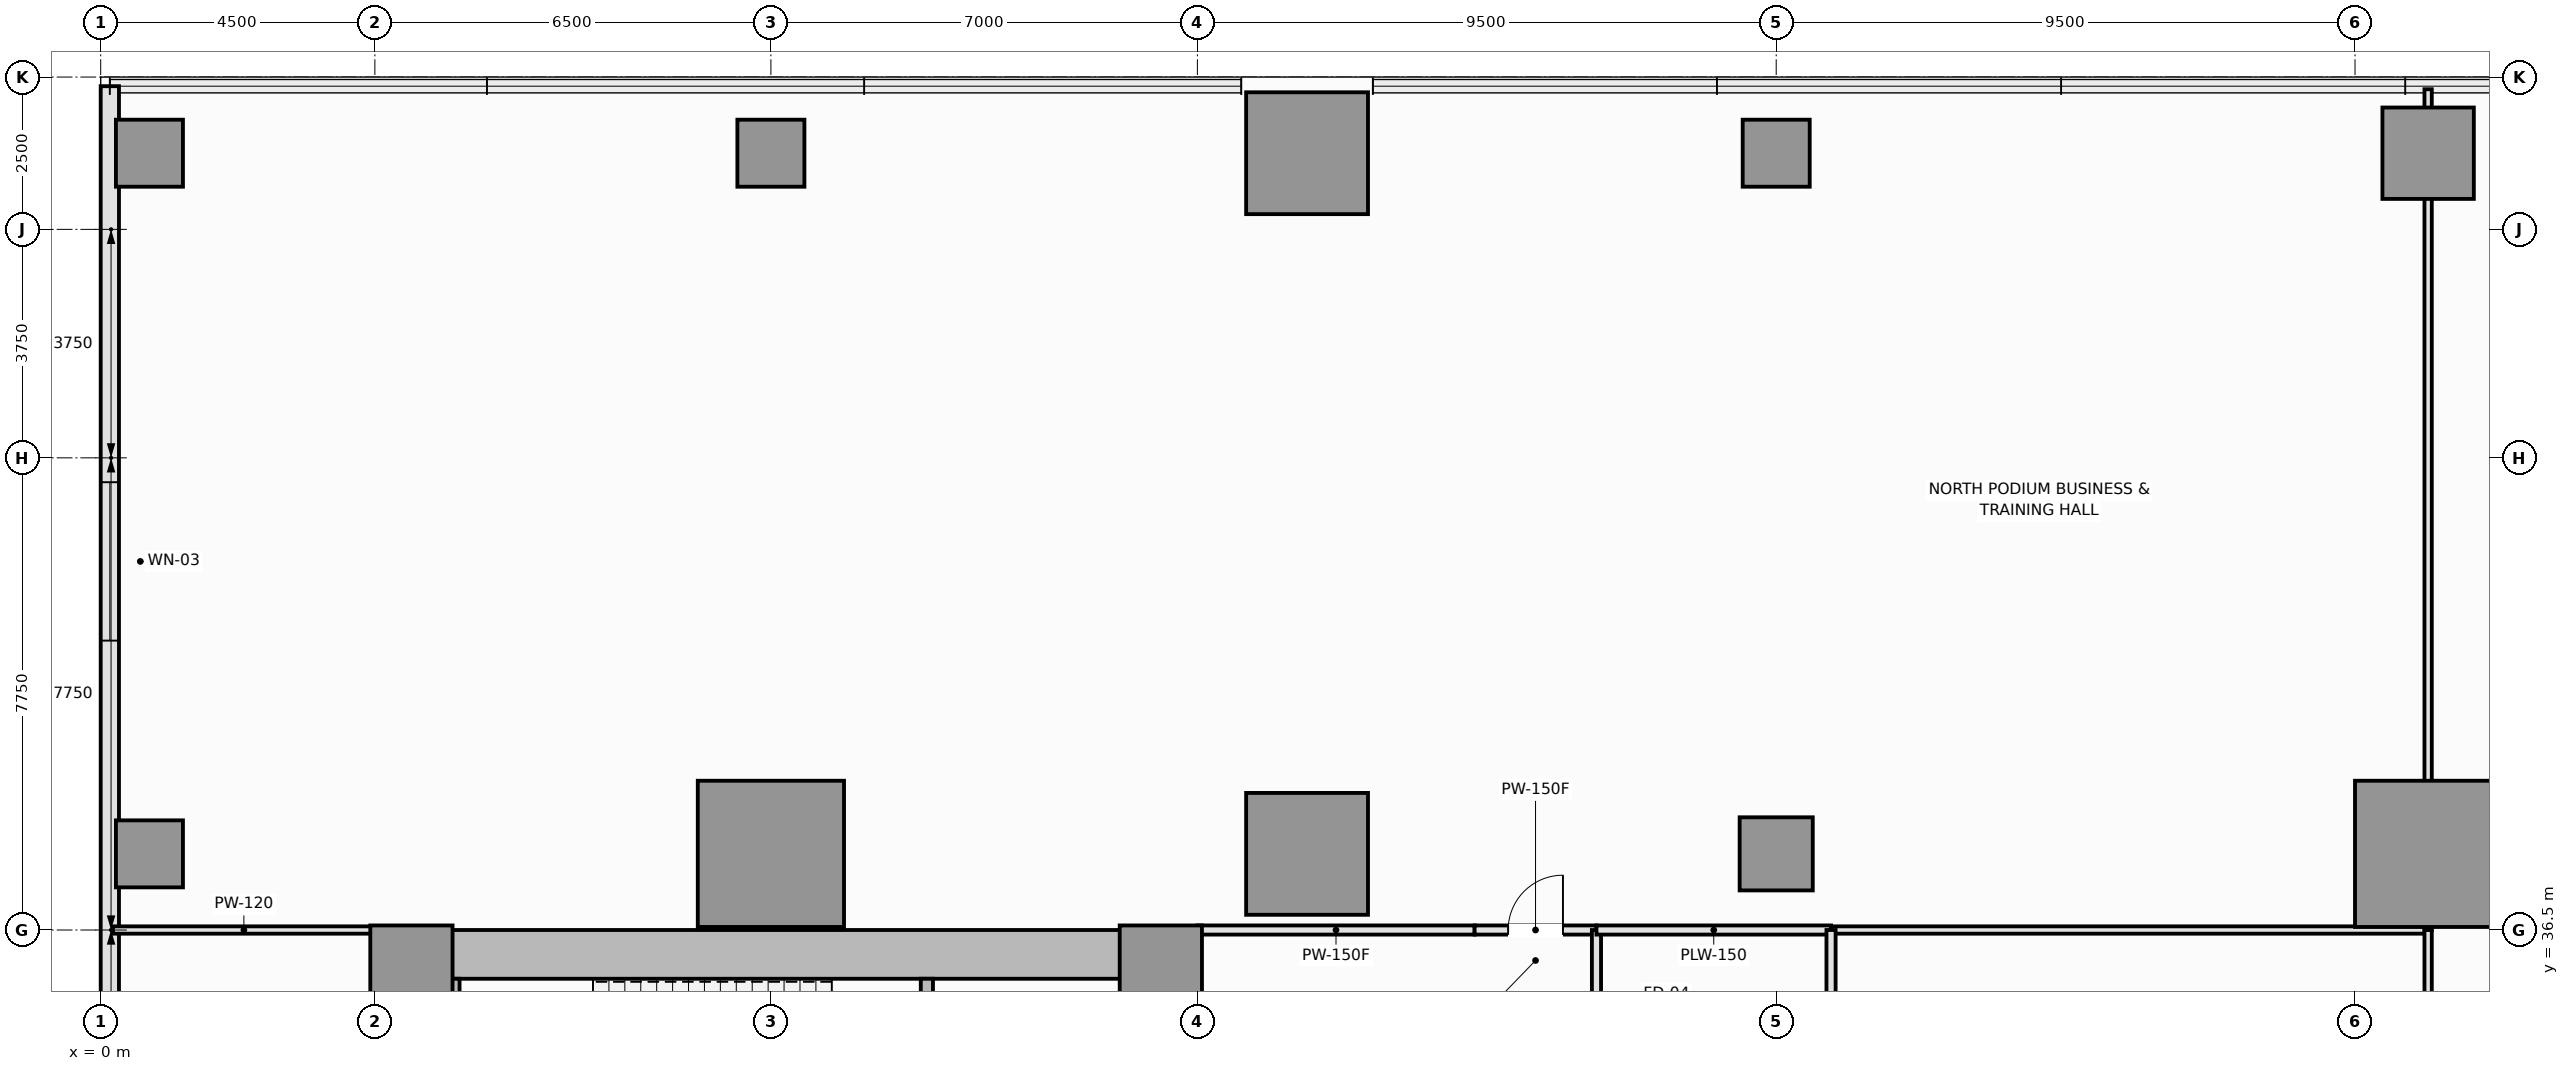
"""IFC4 building model, lengths in metres.
Left out: names, types, materials, properties, quantities, classifications, styles, units other than length and angle.
Written with IfcOpenShell. Run it as: python <this file> out.ifc"""

import sys

from ifc_helpers import new_model, si_unit, direction, frame, frame_2d, origin, origin_2d, place, context, subcontext, project, spatial, rectangle, extrude, element, fill, save


model = new_model("IFC4")
c1 = context("Model", 3, precision=1e-05, world=origin(), true_north=direction((0.0, 1.0)))
c2 = subcontext(c1, "Body", "Model", "MODEL_VIEW")
j1 = project(units=[si_unit("LENGTHUNIT", "METRE"), si_unit("PLANEANGLEUNIT", "RADIAN")], contexts=[c1])
p1 = place(None, origin())
s1 = spatial("IfcSite", under=j1, at=p1, CompositionType="ELEMENT")
p2 = place(p1, origin())
s2 = spatial("IfcBuilding", under=s1, at=p2, CompositionType="ELEMENT")
p3 = place(p2, frame((0.0, 0.0, 20.4)))
s3 = spatial("IfcBuildingStorey", under=s2, at=p3, CompositionType="ELEMENT", Elevation=20.4)
p4 = place(p3, frame((4.5, 36.1, 0.0), z_axis=(0.0, 0.0, 1.0), x_axis=(1.0, 0.0, 0.0)))
e1 = element("IfcWall", 1, at=p4, inside=s3, PredefinedType="SHEAR", context=c2, shape_type="SweptSolid", body=[
    extrude(rectangle(XDim=13.5, YDim=0.8, at=frame_2d((6.75, 0.0))), origin(), (0.0, 0.0, 1.0), 5.2),
])
p5 = place(p3, frame((4.9, 14.8, 0.0), z_axis=(0.0, 0.0, 1.0), x_axis=(0.0, 1.0, 0.0)))
e2 = element("IfcWall", 2, at=p5, inside=s3, PredefinedType="SHEAR", context=c2, shape_type="SweptSolid", body=[
    extrude(rectangle(XDim=20.9, YDim=0.8, at=frame_2d((10.45, 0.0))), origin(), (0.0, 0.0, 1.0), 5.2),
])
p6 = place(p3, frame((17.6, 27.05, 0.0), z_axis=(0.0, 0.0, 1.0), x_axis=(0.0, 1.0, 0.0)))
e3 = element("IfcWall", 3, at=p6, inside=s3, PredefinedType="SHEAR", context=c2, shape_type="SweptSolid", body=[
    extrude(rectangle(XDim=8.65, YDim=0.8, at=frame_2d((4.325, 0.0))), origin(), (0.0, 0.0, 1.0), 5.2),
])
p7 = place(p6, frame((3.45, 0.0, 0.0)))
e4 = element("IfcOpeningElement", 4, at=p7, cuts=e3, PredefinedType="OPENING", context=c2, shape_type="SweptSolid", body=[
    extrude(rectangle(XDim=1.1, YDim=2.15, at=frame_2d((0.55, 1.075))), frame((0.0, 0.41, 0.0), z_axis=(0.0, -1.0, 0.0), x_axis=(1.0, 0.0, 0.0)), (0.0, 0.0, 1.0), 0.82),
])
for number, where, z_axis, x_axis in (
    (5, (5.1, 35.9, 0.0), (0.0, 0.0, 1.0), (1.0, 0.0, 0.0)),
    (6, (17.4, 35.9, 0.0), (0.0, 0.0, 1.0), (1.0, 0.0, 0.0)),
):
    element("IfcColumn", number, at=place(p3, frame(where, z_axis=z_axis, x_axis=x_axis)), inside=s3, PredefinedType="PILASTER", context=c2, shape_type="SweptSolid", body=[
        extrude(rectangle(XDim=1.35, YDim=1.35, at=origin_2d()), origin(), (0.0, 0.0, 1.0), 5.2),
    ])
for number, where, z_axis, x_axis in (
    (7, (11.0, 37.75, 0.0), (0.0, 0.0, 1.0), (1.0, 0.0, 0.0)),
    (8, (38.2, 37.75, 0.0), (0.0, 0.0, 1.0), (1.0, 0.0, 0.0)),
):
    element("IfcColumn", number, at=place(p3, frame(where, z_axis=z_axis, x_axis=x_axis)), inside=s3, PredefinedType="COLUMN", context=c2, shape_type="SweptSolid", body=[
        extrude(rectangle(XDim=2.4, YDim=2.4, at=origin_2d()), origin(), (0.0, 0.0, 1.0), 5.2),
    ])
p8 = place(p3, frame((27.5, 37.75, 0.0), z_axis=(0.0, 0.0, 1.0), x_axis=(1.0, 0.0, 0.0)))
e9 = element("IfcColumn", 9, at=p8, inside=s3, PredefinedType="COLUMN", context=c2, shape_type="SweptSolid", body=[
    extrude(rectangle(XDim=1.2, YDim=1.2, at=origin_2d()), origin(), (0.0, 0.0, 1.0), 5.2),
])
for number, where, z_axis, x_axis in (
    (10, (19.8, 37.75, 0.0), (0.0, 0.0, 1.0), (1.0, 0.0, 0.0)),
    (11, (19.8, 49.25, 0.0), (0.0, 0.0, 1.0), (1.0, 0.0, 0.0)),
):
    element("IfcColumn", number, at=place(p3, frame(where, z_axis=z_axis, x_axis=x_axis)), inside=s3, PredefinedType="COLUMN", context=c2, shape_type="SweptSolid", body=[
        extrude(rectangle(XDim=2.0, YDim=2.0, at=origin_2d()), origin(), (0.0, 0.0, 1.0), 5.2),
    ])
for number, where, z_axis, x_axis in (
    (12, (0.8, 37.75, 0.0), (0.0, 0.0, 1.0), (1.0, 0.0, 0.0)),
    (13, (0.8, 49.25, 0.0), (0.0, 0.0, 1.0), (1.0, 0.0, 0.0)),
    (14, (11.0, 49.25, 0.0), (0.0, 0.0, 1.0), (1.0, 0.0, 0.0)),
    (15, (27.5, 49.25, 0.0), (0.0, 0.0, 1.0), (1.0, 0.0, 0.0)),
):
    element("IfcColumn", number, at=place(p3, frame(where, z_axis=z_axis, x_axis=x_axis)), inside=s3, PredefinedType="COLUMN", context=c2, shape_type="SweptSolid", body=[
        extrude(rectangle(XDim=1.1, YDim=1.1, at=origin_2d()), origin(), (0.0, 0.0, 1.0), 5.2),
    ])
p9 = place(p3, frame((38.2, 49.25, 0.0), z_axis=(0.0, 0.0, 1.0), x_axis=(1.0, 0.0, 0.0)))
e16 = element("IfcColumn", 16, at=p9, inside=s3, PredefinedType="COLUMN", context=c2, shape_type="SweptSolid", body=[
    extrude(rectangle(XDim=1.5, YDim=1.5, at=origin_2d()), origin(), (0.0, 0.0, 1.0), 5.2),
])
p10 = place(p3, frame((0.15, 50.35, 0.0), z_axis=(0.0, 0.0, 1.0), x_axis=(0.0, -1.0, 0.0)))
e17 = element("IfcWall", 17, at=p10, inside=s3, PredefinedType="SOLIDWALL", context=c2, shape_type="SweptSolid", body=[
    extrude(rectangle(XDim=50.2, YDim=0.3, at=frame_2d((25.1, 0.0))), origin(), (0.0, 0.0, 1.0), 5.02),
])
p11 = place(p10, frame((6.5, 0.0, 0.9)))
e18 = element("IfcOpeningElement", 18, at=p11, cuts=e17, PredefinedType="OPENING", context=c2, shape_type="SweptSolid", body=[
    extrude(rectangle(XDim=2.6, YDim=2.2, at=frame_2d((1.3, 1.1))), frame((0.0, 0.16, 0.0), z_axis=(0.0, -1.0, 0.0), x_axis=(1.0, 0.0, 0.0)), (0.0, 0.0, 1.0), 0.32),
])
p12 = place(p10, frame((42.0, 0.0, 0.9)))
e19 = element("IfcOpeningElement", 19, at=p12, cuts=e17, PredefinedType="OPENING", context=c2, shape_type="SweptSolid", body=[
    extrude(rectangle(XDim=2.6, YDim=2.2, at=frame_2d((1.3, 1.1))), frame((0.0, 0.16, 0.0), z_axis=(0.0, -1.0, 0.0), x_axis=(1.0, 0.0, 0.0)), (0.0, 0.0, 1.0), 0.32),
])
p13 = place(p3, frame((5.79, 32.65, 0.0), z_axis=(0.0, 0.0, 1.0), x_axis=(0.0, 1.0, 0.0)))
e20 = element("IfcWall", 20, at=p13, inside=s3, PredefinedType="SOLIDWALL", context=c2, shape_type="SweptSolid", body=[
    extrude(rectangle(XDim=3.05, YDim=0.2, at=frame_2d((1.525, 0.0))), origin(), (0.0, 0.0, 1.0), 5.2),
])
p14 = place(p3, frame((13.56, 32.65, 0.0), z_axis=(0.0, 0.0, 1.0), x_axis=(0.0, 1.0, 0.0)))
e21 = element("IfcWall", 21, at=p14, inside=s3, PredefinedType="SOLIDWALL", context=c2, shape_type="SweptSolid", body=[
    extrude(rectangle(XDim=3.05, YDim=0.2, at=frame_2d((1.525, 0.0))), origin(), (0.0, 0.0, 1.0), 5.2),
])
p15 = place(p14, frame((0.95, 0.0, 0.0)))
e22 = element("IfcOpeningElement", 22, at=p15, cuts=e21, PredefinedType="OPENING", context=c2, shape_type="SweptSolid", body=[
    extrude(rectangle(XDim=1.15, YDim=2.15, at=frame_2d((0.575, 1.075))), frame((0.0, 0.11, 0.0), z_axis=(0.0, -1.0, 0.0), x_axis=(1.0, 0.0, 0.0)), (0.0, 0.0, 1.0), 0.22),
])
p16 = place(p3, frame((18.0, 36.5, 0.0), z_axis=(0.0, 0.0, 1.0), x_axis=(1.0, 0.0, 0.0)))
e23 = element("IfcWall", 23, at=p16, inside=s3, PredefinedType="PARTITIONING", context=c2, shape_type="SweptSolid", body=[
    extrude(rectangle(XDim=4.55, YDim=0.15, at=frame_2d((2.275, 0.0))), origin(), (0.0, 0.0, 1.0), 5.02),
])
p17 = place(p3, frame((22.55, 36.5, 0.0), z_axis=(0.0, 0.0, 1.0), x_axis=(1.0, 0.0, 0.0)))
e24 = element("IfcWall", 24, at=p17, inside=s3, PredefinedType="PARTITIONING", context=c2, shape_type="SweptSolid", body=[
    extrude(rectangle(XDim=2.0, YDim=0.15, at=frame_2d((1.0, 0.0))), origin(), (0.0, 0.0, 1.0), 5.02),
])
p18 = place(p17, frame((0.55, 0.0, 0.0)))
e25 = element("IfcOpeningElement", 25, at=p18, cuts=e24, PredefinedType="OPENING", context=c2, shape_type="SweptSolid", body=[
    extrude(rectangle(XDim=0.9, YDim=2.1, at=frame_2d((0.45, 1.05))), frame((0.0, 0.085, 0.0), z_axis=(0.0, -1.0, 0.0), x_axis=(1.0, 0.0, 0.0)), (0.0, 0.0, 1.0), 0.17),
])
p19 = place(p3, frame((24.55, 33.3, 0.0), z_axis=(0.0, 0.0, 1.0), x_axis=(0.0, 1.0, 0.0)))
e26 = element("IfcWall", 26, at=p19, inside=s3, PredefinedType="PLUMBINGWALL", context=c2, shape_type="SweptSolid", body=[
    extrude(rectangle(XDim=3.2, YDim=0.15, at=frame_2d((1.6, 0.0))), origin(), (0.0, 0.0, 1.0), 5.02),
])
p20 = place(p19, frame((1.15, 0.0, 0.0)))
e27 = element("IfcOpeningElement", 27, at=p20, cuts=e26, PredefinedType="OPENING", context=c2, shape_type="SweptSolid", body=[
    extrude(rectangle(XDim=0.9, YDim=2.1, at=frame_2d((0.45, 1.05))), frame((0.0, 0.085, 0.0), z_axis=(0.0, -1.0, 0.0), x_axis=(1.0, 0.0, 0.0)), (0.0, 0.0, 1.0), 0.17),
])
p21 = place(p3, frame((0.2, 36.5, 0.0), z_axis=(0.0, 0.0, 1.0), x_axis=(1.0, 0.0, 0.0)))
e28 = element("IfcWall", 28, at=p21, inside=s3, PredefinedType="PARTITIONING", context=c2, shape_type="SweptSolid", body=[
    extrude(rectangle(XDim=4.3, YDim=0.12, at=frame_2d((2.15, 0.0))), origin(), (0.0, 0.0, 1.0), 5.02),
])
p22 = place(p3, frame((24.55, 36.5, 0.0), z_axis=(0.0, 0.0, 1.0), x_axis=(1.0, 0.0, 0.0)))
e29 = element("IfcWall", 29, at=p22, inside=s3, PredefinedType="PLUMBINGWALL", context=c2, shape_type="SweptSolid", body=[
    extrude(rectangle(XDim=3.85, YDim=0.15, at=frame_2d((1.925, 0.0))), origin(), (0.0, 0.0, 1.0), 5.02),
])
p23 = place(p3, frame((28.4, 36.5, 0.0), z_axis=(0.0, 0.0, 1.0), x_axis=(1.0, 0.0, 0.0)))
e30 = element("IfcWall", 30, at=p23, inside=s3, PredefinedType="PARTITIONING", context=c2, shape_type="SweptSolid", body=[
    extrude(rectangle(XDim=9.8, YDim=0.12, at=frame_2d((4.9, 0.0))), origin(), (0.0, 0.0, 1.0), 5.02),
])
p24 = place(p3, frame((38.2, 36.5, 0.0), z_axis=(0.0, 0.0, 1.0), x_axis=(0.0, 1.0, 0.0)))
e31 = element("IfcWall", 31, at=p24, inside=s3, PredefinedType="PARTITIONING", context=c2, shape_type="SweptSolid", body=[
    extrude(rectangle(XDim=13.8, YDim=0.12, at=frame_2d((6.9, 0.0))), origin(), (0.0, 0.0, 1.0), 3.0),
])
p25 = place(p3, frame((28.4, 33.3, 0.0), z_axis=(0.0, 0.0, 1.0), x_axis=(0.0, 1.0, 0.0)))
e32 = element("IfcWall", 32, at=p25, inside=s3, PredefinedType="PLUMBINGWALL", context=c2, shape_type="SweptSolid", body=[
    extrude(rectangle(XDim=3.2, YDim=0.15, at=frame_2d((1.6, 0.0))), origin(), (0.0, 0.0, 1.0), 5.02),
])
p26 = place(p3, frame((38.2, 22.9, 0.0), z_axis=(0.0, 0.0, 1.0), x_axis=(0.0, 1.0, 0.0)))
e33 = element("IfcWall", 33, at=p26, inside=s3, PredefinedType="PARTITIONING", context=c2, shape_type="SweptSolid", body=[
    extrude(rectangle(XDim=13.6, YDim=0.12, at=frame_2d((6.8, 0.0))), origin(), (0.0, 0.0, 1.0), 4.42),
])
p27 = place(p11, origin())
e34 = element("IfcWindow", 34, at=p27, inside=s3, PartitioningType="SINGLE_PANEL", PredefinedType="WINDOW", context=c2, shape_type="SweptSolid", body=[
    extrude(rectangle(XDim=2.6, YDim=2.2, at=frame_2d((1.3, 1.1))), frame((0.0, 0.03, 0.0), z_axis=(0.0, -1.0, 0.0), x_axis=(1.0, 0.0, 0.0)), (0.0, 0.0, 1.0), 0.06),
])
fill(e18, e34)
p28 = place(p18, origin())
e35 = element("IfcDoor", 35, at=p28, inside=s3, OperationType="SINGLE_SWING_RIGHT", PredefinedType="DOOR", context=c2, shape_type="SweptSolid", body=[
    extrude(rectangle(XDim=0.9, YDim=2.1, at=frame_2d((0.45, 1.05))), frame((0.0, 0.025, 0.0), z_axis=(0.0, -1.0, 0.0), x_axis=(1.0, 0.0, 0.0)), (0.0, 0.0, 1.0), 0.05),
])
fill(e25, e35)
save(model, sys.argv[1])
